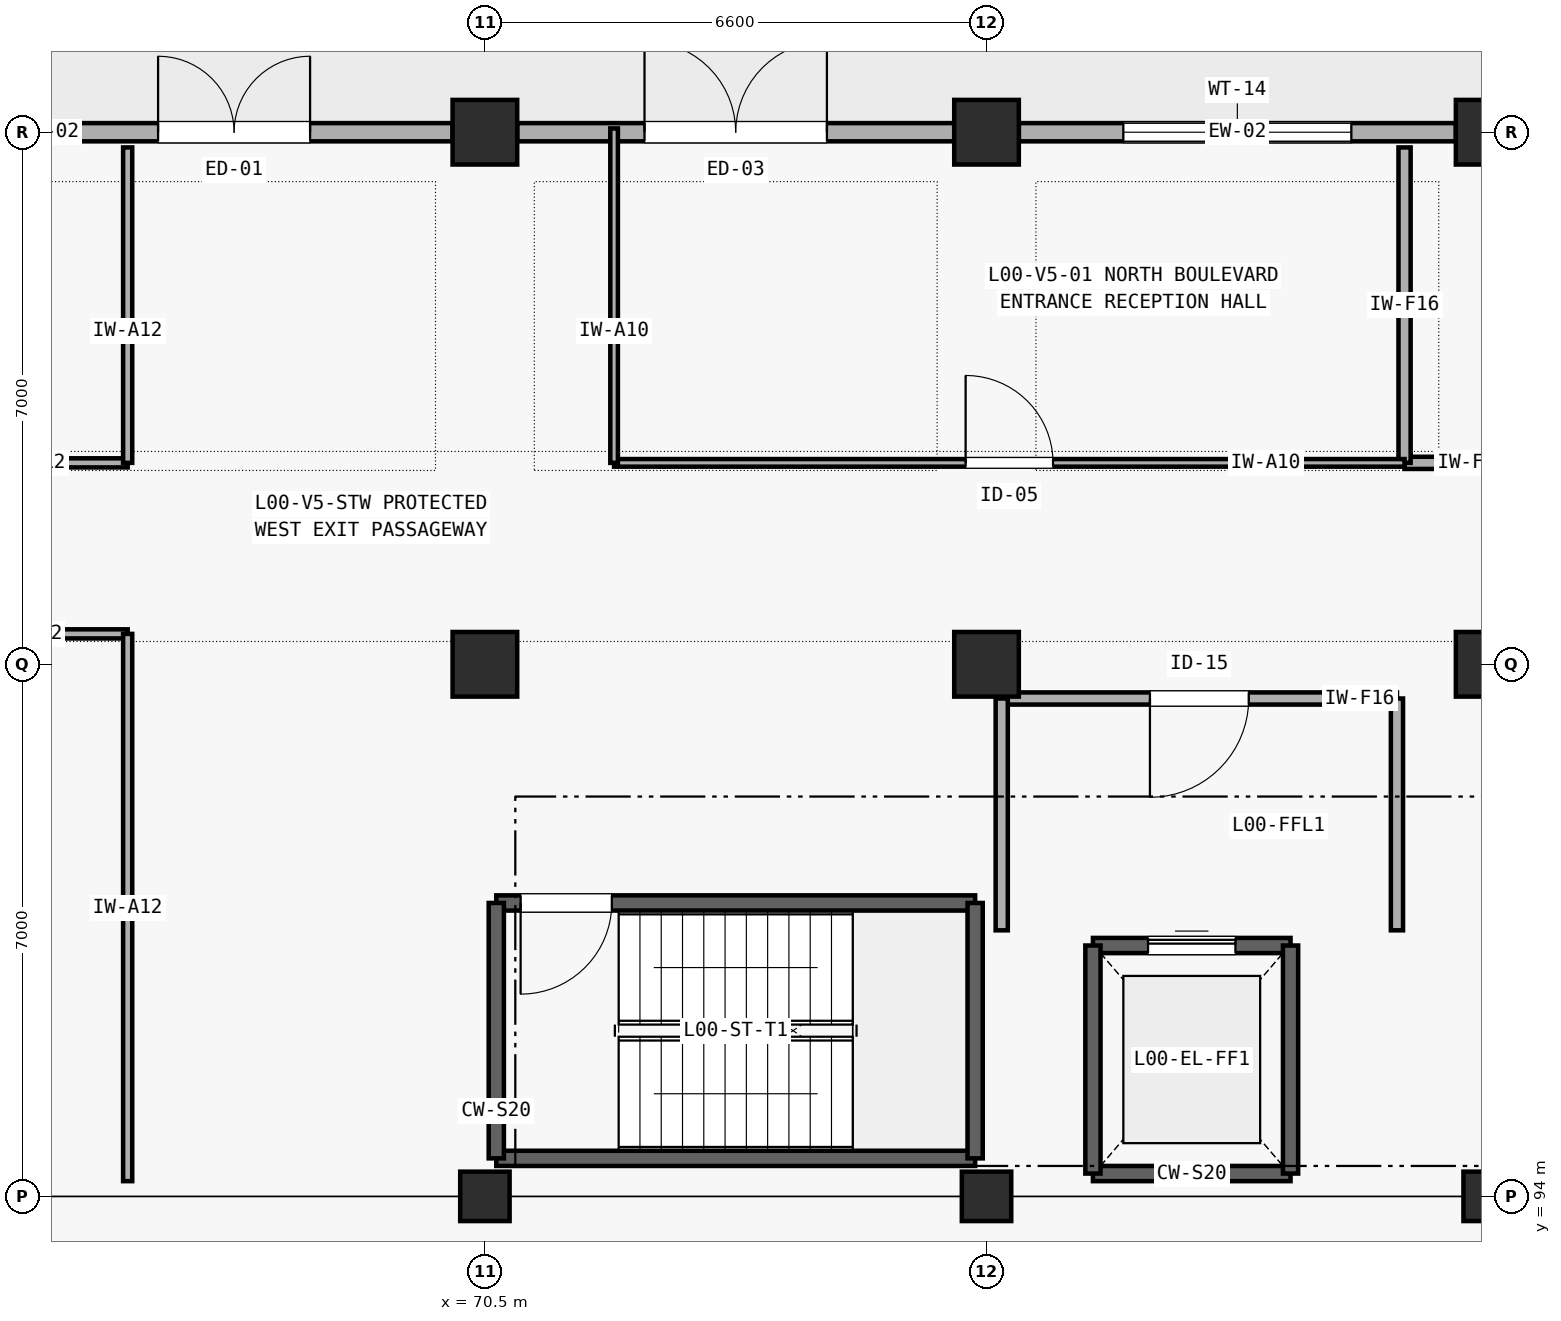
"""IFC4 building model, lengths in metres.
Left out: names, types, materials, properties, quantities, classifications, styles, units other than length and angle.
Written with IfcOpenShell. Run it as: python <this file> out.ifc"""

import sys

from ifc_helpers import new_model, si_unit, direction, frame, frame_2d, origin, origin_2d, place, context, subcontext, project, spatial, rectangle, extrude, element, fill, save


model = new_model("IFC4")
c1 = context("Model", 3, precision=1e-05, world=origin(), true_north=direction((0.0, 1.0)))
c2 = subcontext(c1, "Body", "Model", "MODEL_VIEW")
j1 = project(units=[si_unit("LENGTHUNIT", "METRE"), si_unit("PLANEANGLEUNIT", "RADIAN")], contexts=[c1])
p1 = place(None, origin())
s1 = spatial("IfcSite", under=j1, at=p1, CompositionType="ELEMENT")
p2 = place(p1, origin())
s2 = spatial("IfcBuilding", under=s1, at=p2, CompositionType="ELEMENT")
p3 = place(p2, origin())
s3 = spatial("IfcBuildingStorey", under=s2, at=p3, CompositionType="ELEMENT", Elevation=0.0)
p4 = place(p3, frame((70.5, 94.0, 0.0), z_axis=(0.0, 0.0, 1.0), x_axis=(1.0, 0.0, 0.0)))
e1 = element("IfcColumn", 1, at=p4, inside=s3, PredefinedType="COLUMN", context=c2, shape_type="SweptSolid", body=[
    extrude(rectangle(XDim=0.65, YDim=0.65, at=origin_2d()), origin(), (0.0, 0.0, 1.0), 4.2),
])
for number, where, z_axis, x_axis in (
    (2, (70.5, 101.0, 0.0), (0.0, 0.0, 1.0), (1.0, 0.0, 0.0)),
    (3, (70.5, 108.0, 0.0), (0.0, 0.0, 1.0), (1.0, 0.0, 0.0)),
):
    element("IfcColumn", number, at=place(p3, frame(where, z_axis=z_axis, x_axis=x_axis)), inside=s3, PredefinedType="COLUMN", context=c2, shape_type="SweptSolid", body=[
        extrude(rectangle(XDim=0.85, YDim=0.85, at=origin_2d()), origin(), (0.0, 0.0, 1.0), 4.2),
    ])
p5 = place(p3, frame((77.1, 94.0, 0.0), z_axis=(0.0, 0.0, 1.0), x_axis=(1.0, 0.0, 0.0)))
e4 = element("IfcColumn", 4, at=p5, inside=s3, PredefinedType="COLUMN", context=c2, shape_type="SweptSolid", body=[
    extrude(rectangle(XDim=0.65, YDim=0.65, at=origin_2d()), origin(), (0.0, 0.0, 1.0), 4.2),
])
for number, where, z_axis, x_axis in (
    (5, (77.1, 101.0, 0.0), (0.0, 0.0, 1.0), (1.0, 0.0, 0.0)),
    (6, (77.1, 108.0, 0.0), (0.0, 0.0, 1.0), (1.0, 0.0, 0.0)),
):
    element("IfcColumn", number, at=place(p3, frame(where, z_axis=z_axis, x_axis=x_axis)), inside=s3, PredefinedType="COLUMN", context=c2, shape_type="SweptSolid", body=[
        extrude(rectangle(XDim=0.85, YDim=0.85, at=origin_2d()), origin(), (0.0, 0.0, 1.0), 4.2),
    ])
p6 = place(p3, frame((83.7, 94.0, 0.0), z_axis=(0.0, 0.0, 1.0), x_axis=(1.0, 0.0, 0.0)))
e7 = element("IfcColumn", 7, at=p6, inside=s3, PredefinedType="COLUMN", context=c2, shape_type="SweptSolid", body=[
    extrude(rectangle(XDim=0.65, YDim=0.65, at=origin_2d()), origin(), (0.0, 0.0, 1.0), 4.2),
])
for number, where, z_axis, x_axis in (
    (8, (83.7, 101.0, 0.0), (0.0, 0.0, 1.0), (1.0, 0.0, 0.0)),
    (9, (83.7, 108.0, 0.0), (0.0, 0.0, 1.0), (1.0, 0.0, 0.0)),
):
    element("IfcColumn", number, at=place(p3, frame(where, z_axis=z_axis, x_axis=x_axis)), inside=s3, PredefinedType="COLUMN", context=c2, shape_type="SweptSolid", body=[
        extrude(rectangle(XDim=0.85, YDim=0.85, at=origin_2d()), origin(), (0.0, 0.0, 1.0), 4.2),
    ])
p7 = place(p3, frame((64.325, 108.0, 0.0), z_axis=(0.0, 0.0, 1.0), x_axis=(1.0, 0.0, 0.0)))
e10 = element("IfcWall", 10, at=p7, inside=s3, PredefinedType="SOLIDWALL", context=c2, shape_type="SweptSolid", body=[
    extrude(rectangle(XDim=5.75, YDim=0.24, at=frame_2d((2.875, 0.0))), origin(), (0.0, 0.0, 1.0), 3.345),
])
p8 = place(p7, frame((1.875, 0.0, 0.0)))
e11 = element("IfcOpeningElement", 11, at=p8, cuts=e10, PredefinedType="OPENING", context=c2, shape_type="SweptSolid", body=[
    extrude(rectangle(XDim=2.0, YDim=2.2, at=frame_2d((1.0, 1.1))), frame((0.0, 0.13, 0.0), z_axis=(0.0, -1.0, 0.0), x_axis=(1.0, 0.0, 0.0)), (0.0, 0.0, 1.0), 0.26),
])
p9 = place(p3, frame((70.925, 108.0, 0.0), z_axis=(0.0, 0.0, 1.0), x_axis=(1.0, 0.0, 0.0)))
e12 = element("IfcWall", 12, at=p9, inside=s3, PredefinedType="SOLIDWALL", context=c2, shape_type="SweptSolid", body=[
    extrude(rectangle(XDim=5.75, YDim=0.24, at=frame_2d((2.875, 0.0))), origin(), (0.0, 0.0, 1.0), 3.345),
])
p10 = place(p9, frame((1.675, 0.0, 0.0)))
e13 = element("IfcOpeningElement", 13, at=p10, cuts=e12, PredefinedType="OPENING", context=c2, shape_type="SweptSolid", body=[
    extrude(rectangle(XDim=2.4, YDim=2.25, at=frame_2d((1.2, 1.125))), frame((0.0, 0.13, 0.0), z_axis=(0.0, -1.0, 0.0), x_axis=(1.0, 0.0, 0.0)), (0.0, 0.0, 1.0), 0.26),
])
p11 = place(p3, frame((77.525, 108.0, 0.0), z_axis=(0.0, 0.0, 1.0), x_axis=(1.0, 0.0, 0.0)))
e14 = element("IfcWall", 14, at=p11, inside=s3, PredefinedType="SOLIDWALL", context=c2, shape_type="SweptSolid", body=[
    extrude(rectangle(XDim=5.75, YDim=0.24, at=frame_2d((2.875, 0.0))), origin(), (0.0, 0.0, 1.0), 3.135),
])
p12 = place(p11, frame((1.375, 0.0, 0.85)))
e15 = element("IfcOpeningElement", 15, at=p12, cuts=e14, PredefinedType="OPENING", context=c2, shape_type="SweptSolid", body=[
    extrude(rectangle(XDim=3.0, YDim=1.5, at=frame_2d((1.5, 0.75))), frame((0.0, 0.13, 0.0), z_axis=(0.0, -1.0, 0.0), x_axis=(1.0, 0.0, 0.0)), (0.0, 0.0, 1.0), 0.26),
])
p13 = place(p3, frame((70.65, 94.5, 0.0), z_axis=(0.0, 0.0, 1.0), x_axis=(1.0, 0.0, 0.0)))
e16 = element("IfcWall", 16, at=p13, inside=s3, PredefinedType="SHEAR", context=c2, shape_type="SweptSolid", body=[
    extrude(rectangle(XDim=6.3, YDim=0.2, at=frame_2d((3.15, 0.0))), origin(), (0.0, 0.0, 1.0), 4.2),
])
p14 = place(p3, frame((70.65, 97.86, 0.0), z_axis=(0.0, 0.0, 1.0), x_axis=(1.0, 0.0, 0.0)))
e17 = element("IfcWall", 17, at=p14, inside=s3, PredefinedType="SHEAR", context=c2, shape_type="SweptSolid", body=[
    extrude(rectangle(XDim=6.3, YDim=0.2, at=frame_2d((3.15, 0.0))), origin(), (0.0, 0.0, 1.0), 4.2),
])
p15 = place(p14, frame((0.32, 0.0, 0.0)))
e18 = element("IfcOpeningElement", 18, at=p15, cuts=e17, PredefinedType="OPENING", context=c2, shape_type="SweptSolid", body=[
    extrude(rectangle(XDim=1.2, YDim=2.15, at=frame_2d((0.6, 1.075))), frame((0.0, 0.11, 0.0), z_axis=(0.0, -1.0, 0.0), x_axis=(1.0, 0.0, 0.0)), (0.0, 0.0, 1.0), 0.22),
])
for number, where, z_axis, x_axis in (
    (19, (70.65, 94.5, 0.0), (0.0, 0.0, 1.0), (0.0, 1.0, 0.0)),
    (20, (76.95, 94.5, 0.0), (0.0, 0.0, 1.0), (0.0, 1.0, 0.0)),
):
    element("IfcWall", number, at=place(p3, frame(where, z_axis=z_axis, x_axis=x_axis)), inside=s3, PredefinedType="SHEAR", context=c2, shape_type="SweptSolid", body=[
        extrude(rectangle(XDim=3.36, YDim=0.2, at=frame_2d((1.68, 0.0))), origin(), (0.0, 0.0, 1.0), 4.2),
    ])
p16 = place(p3, frame((78.5, 94.3, 0.0), z_axis=(0.0, 0.0, 1.0), x_axis=(1.0, 0.0, 0.0)))
e21 = element("IfcWall", 21, at=p16, inside=s3, PredefinedType="SHEAR", context=c2, shape_type="SweptSolid", body=[
    extrude(rectangle(XDim=2.6, YDim=0.2, at=frame_2d((1.3, 0.0))), origin(), (0.0, 0.0, 1.0), 4.2),
])
p17 = place(p3, frame((78.5, 97.3, 0.0), z_axis=(0.0, 0.0, 1.0), x_axis=(1.0, 0.0, 0.0)))
e22 = element("IfcWall", 22, at=p17, inside=s3, PredefinedType="SHEAR", context=c2, shape_type="SweptSolid", body=[
    extrude(rectangle(XDim=2.6, YDim=0.2, at=frame_2d((1.3, 0.0))), origin(), (0.0, 0.0, 1.0), 4.2),
])
p18 = place(p17, frame((0.725, 0.0, 0.0)))
e23 = element("IfcOpeningElement", 23, at=p18, cuts=e22, PredefinedType="OPENING", context=c2, shape_type="SweptSolid", body=[
    extrude(rectangle(XDim=1.15, YDim=2.2, at=frame_2d((0.575, 1.1))), frame((0.0, 0.11, 0.0), z_axis=(0.0, -1.0, 0.0), x_axis=(1.0, 0.0, 0.0)), (0.0, 0.0, 1.0), 0.22),
])
for number, where, z_axis, x_axis in (
    (24, (78.5, 94.3, 0.0), (0.0, 0.0, 1.0), (0.0, 1.0, 0.0)),
    (25, (81.1, 94.3, 0.0), (0.0, 0.0, 1.0), (0.0, 1.0, 0.0)),
):
    element("IfcWall", number, at=place(p3, frame(where, z_axis=z_axis, x_axis=x_axis)), inside=s3, PredefinedType="SHEAR", context=c2, shape_type="SweptSolid", body=[
        extrude(rectangle(XDim=3.0, YDim=0.2, at=frame_2d((1.5, 0.0))), origin(), (0.0, 0.0, 1.0), 4.2),
    ])
p19 = place(p3, frame((77.3, 100.55, 0.0), z_axis=(0.0, 0.0, 1.0), x_axis=(1.0, 0.0, 0.0)))
e26 = element("IfcWall", 26, at=p19, inside=s3, PredefinedType="SOLIDWALL", context=c2, shape_type="SweptSolid", body=[
    extrude(rectangle(XDim=5.2, YDim=0.16, at=frame_2d((2.6, 0.0))), origin(), (0.0, 0.0, 1.0), 3.9),
])
p20 = place(p19, frame((1.95, 0.0, 0.0)))
e27 = element("IfcOpeningElement", 27, at=p20, cuts=e26, PredefinedType="OPENING", context=c2, shape_type="SweptSolid", body=[
    extrude(rectangle(XDim=1.3, YDim=2.15, at=frame_2d((0.65, 1.075))), frame((0.0, 0.09, 0.0), z_axis=(0.0, -1.0, 0.0), x_axis=(1.0, 0.0, 0.0)), (0.0, 0.0, 1.0), 0.18),
])
p21 = place(p3, frame((77.3, 97.5, 0.0), z_axis=(0.0, 0.0, 1.0), x_axis=(0.0, 1.0, 0.0)))
e28 = element("IfcWall", 28, at=p21, inside=s3, PredefinedType="SOLIDWALL", context=c2, shape_type="SweptSolid", body=[
    extrude(rectangle(XDim=3.05, YDim=0.16, at=frame_2d((1.525, 0.0))), origin(), (0.0, 0.0, 1.0), 3.405),
])
p22 = place(p3, frame((82.5, 97.5, 0.0), z_axis=(0.0, 0.0, 1.0), x_axis=(0.0, 1.0, 0.0)))
e29 = element("IfcWall", 29, at=p22, inside=s3, PredefinedType="SOLIDWALL", context=c2, shape_type="SweptSolid", body=[
    extrude(rectangle(XDim=3.05, YDim=0.16, at=frame_2d((1.525, 0.0))), origin(), (0.0, 0.0, 1.0), 3.9),
])
p23 = place(p3, frame((82.6, 103.65, 0.0), z_axis=(0.0, 0.0, 1.0), x_axis=(1.0, 0.0, 0.0)))
e30 = element("IfcWall", 30, at=p23, inside=s3, PredefinedType="SOLIDWALL", context=c2, shape_type="SweptSolid", body=[
    extrude(rectangle(XDim=6.6, YDim=0.16, at=frame_2d((3.3, 0.0))), origin(), (0.0, 0.0, 1.0), 3.9),
])
p24 = place(p23, frame((2.75, 0.0, 0.0)))
e31 = element("IfcOpeningElement", 31, at=p24, cuts=e30, PredefinedType="OPENING", context=c2, shape_type="SweptSolid", body=[
    extrude(rectangle(XDim=1.1, YDim=2.2, at=frame_2d((0.55, 1.1))), frame((0.0, 0.09, 0.0), z_axis=(0.0, -1.0, 0.0), x_axis=(1.0, 0.0, 0.0)), (0.0, 0.0, 1.0), 0.18),
])
p25 = place(p3, frame((82.6, 103.65, 0.0), z_axis=(0.0, 0.0, 1.0), x_axis=(0.0, 1.0, 0.0)))
e32 = element("IfcWall", 32, at=p25, inside=s3, PredefinedType="SOLIDWALL", context=c2, shape_type="SweptSolid", body=[
    extrude(rectangle(XDim=4.15, YDim=0.16, at=frame_2d((2.075, 0.0))), origin(), (0.0, 0.0, 1.0), 3.9),
])
p26 = place(p3, frame((72.2, 103.65, 0.0), z_axis=(0.0, 0.0, 1.0), x_axis=(1.0, 0.0, 0.0)))
e33 = element("IfcWall", 33, at=p26, inside=s3, PredefinedType="PARTITIONING", context=c2, shape_type="SweptSolid", body=[
    extrude(rectangle(XDim=10.4, YDim=0.1, at=frame_2d((5.2, 0.0))), origin(), (0.0, 0.0, 1.0), 3.9),
])
p27 = place(p26, frame((4.625, 0.0, 0.0)))
e34 = element("IfcOpeningElement", 34, at=p27, cuts=e33, PredefinedType="OPENING", context=c2, shape_type="SweptSolid", body=[
    extrude(rectangle(XDim=1.15, YDim=2.15, at=frame_2d((0.575, 1.075))), frame((0.0, 0.06, 0.0), z_axis=(0.0, -1.0, 0.0), x_axis=(1.0, 0.0, 0.0)), (0.0, 0.0, 1.0), 0.12),
])
p28 = place(p3, frame((72.2, 103.65, 0.0), z_axis=(0.0, 0.0, 1.0), x_axis=(0.0, 1.0, 0.0)))
e35 = element("IfcWall", 35, at=p28, inside=s3, PredefinedType="PARTITIONING", context=c2, shape_type="SweptSolid", body=[
    extrude(rectangle(XDim=4.4, YDim=0.1, at=frame_2d((2.2, 0.0))), origin(), (0.0, 0.0, 1.0), 3.9),
])
p29 = place(p3, frame((57.5, 103.65, 0.0), z_axis=(0.0, 0.0, 1.0), x_axis=(1.0, 0.0, 0.0)))
e36 = element("IfcWall", 36, at=p29, inside=s3, PredefinedType="PARTITIONING", context=c2, shape_type="SweptSolid", body=[
    extrude(rectangle(XDim=8.3, YDim=0.12, at=frame_2d((4.15, 0.0))), origin(), (0.0, 0.0, 1.0), 3.9),
])
p30 = place(p29, frame((3.525, 0.0, 0.0)))
e37 = element("IfcOpeningElement", 37, at=p30, cuts=e36, PredefinedType="OPENING", context=c2, shape_type="SweptSolid", body=[
    extrude(rectangle(XDim=1.25, YDim=2.15, at=frame_2d((0.625, 1.075))), frame((0.0, 0.07, 0.0), z_axis=(0.0, -1.0, 0.0), x_axis=(1.0, 0.0, 0.0)), (0.0, 0.0, 1.0), 0.14),
])
p31 = place(p3, frame((65.8, 103.65, 0.0), z_axis=(0.0, 0.0, 1.0), x_axis=(0.0, 1.0, 0.0)))
e38 = element("IfcWall", 38, at=p31, inside=s3, PredefinedType="PARTITIONING", context=c2, shape_type="SweptSolid", body=[
    extrude(rectangle(XDim=4.15, YDim=0.12, at=frame_2d((2.075, 0.0))), origin(), (0.0, 0.0, 1.0), 3.9),
])
p32 = place(p3, frame((57.5, 101.4, 0.0), z_axis=(0.0, 0.0, 1.0), x_axis=(1.0, 0.0, 0.0)))
e39 = element("IfcWall", 39, at=p32, inside=s3, PredefinedType="PARTITIONING", context=c2, shape_type="SweptSolid", body=[
    extrude(rectangle(XDim=8.3, YDim=0.12, at=frame_2d((4.15, 0.0))), origin(), (0.0, 0.0, 1.0), 3.9),
])
p33 = place(p32, frame((3.225, 0.0, 0.0)))
e40 = element("IfcOpeningElement", 40, at=p33, cuts=e39, PredefinedType="OPENING", context=c2, shape_type="SweptSolid", body=[
    extrude(rectangle(XDim=1.45, YDim=2.2, at=frame_2d((0.725, 1.1))), frame((0.0, 0.07, 0.0), z_axis=(0.0, -1.0, 0.0), x_axis=(1.0, 0.0, 0.0)), (0.0, 0.0, 1.0), 0.14),
])
p34 = place(p3, frame((65.8, 94.2, 0.0), z_axis=(0.0, 0.0, 1.0), x_axis=(0.0, 1.0, 0.0)))
e41 = element("IfcWall", 41, at=p34, inside=s3, PredefinedType="PARTITIONING", context=c2, shape_type="SweptSolid", body=[
    extrude(rectangle(XDim=7.2, YDim=0.12, at=frame_2d((3.6, 0.0))), origin(), (0.0, 0.0, 1.0), 3.9),
])
p35 = place(p8, origin())
e42 = element("IfcDoor", 42, at=p35, inside=s3, OperationType="DOUBLE_DOOR_SINGLE_SWING", PredefinedType="DOOR", context=c2, shape_type="SweptSolid", body=[
    extrude(rectangle(XDim=2.0, YDim=2.2, at=frame_2d((1.0, 1.1))), frame((0.0, 0.025, 0.0), z_axis=(0.0, -1.0, 0.0), x_axis=(1.0, 0.0, 0.0)), (0.0, 0.0, 1.0), 0.05),
])
fill(e11, e42)
p36 = place(p10, origin())
e43 = element("IfcDoor", 43, at=p36, inside=s3, OperationType="DOUBLE_DOOR_SINGLE_SWING", PredefinedType="DOOR", context=c2, shape_type="SweptSolid", body=[
    extrude(rectangle(XDim=2.4, YDim=2.25, at=frame_2d((1.2, 1.125))), frame((0.0, 0.025, 0.0), z_axis=(0.0, -1.0, 0.0), x_axis=(1.0, 0.0, 0.0)), (0.0, 0.0, 1.0), 0.05),
])
fill(e13, e43)
p37 = place(p12, origin())
e44 = element("IfcWindow", 44, at=p37, inside=s3, PartitioningType="SINGLE_PANEL", PredefinedType="WINDOW", context=c2, shape_type="SweptSolid", body=[
    extrude(rectangle(XDim=3.0, YDim=1.5, at=frame_2d((1.5, 0.75))), frame((0.0, 0.03, 0.0), z_axis=(0.0, -1.0, 0.0), x_axis=(1.0, 0.0, 0.0)), (0.0, 0.0, 1.0), 0.06),
])
fill(e15, e44)
p38 = place(p15, frame((1.2, 0.0, 0.0), z_axis=(0.0, 0.0, 1.0), x_axis=(-1.0, 0.0, 0.0)))
e45 = element("IfcDoor", 45, at=p38, inside=s3, OperationType="SINGLE_SWING_RIGHT", PredefinedType="DOOR", context=c2, shape_type="SweptSolid", body=[
    extrude(rectangle(XDim=1.2, YDim=2.15, at=frame_2d((0.6, 1.075))), frame((0.0, 0.025, 0.0), z_axis=(0.0, -1.0, 0.0), x_axis=(1.0, 0.0, 0.0)), (0.0, 0.0, 1.0), 0.05),
])
fill(e18, e45)
p39 = place(p18, origin())
e46 = element("IfcDoor", 46, at=p39, inside=s3, OperationType="SLIDING_TO_LEFT", PredefinedType="DOOR", context=c2, shape_type="SweptSolid", body=[
    extrude(rectangle(XDim=1.15, YDim=2.2, at=frame_2d((0.575, 1.1))), frame((0.0, 0.025, 0.0), z_axis=(0.0, -1.0, 0.0), x_axis=(1.0, 0.0, 0.0)), (0.0, 0.0, 1.0), 0.05),
])
fill(e23, e46)
p40 = place(p20, frame((1.3, 0.0, 0.0), z_axis=(0.0, 0.0, 1.0), x_axis=(-1.0, 0.0, 0.0)))
e47 = element("IfcDoor", 47, at=p40, inside=s3, OperationType="SINGLE_SWING_RIGHT", PredefinedType="DOOR", context=c2, shape_type="SweptSolid", body=[
    extrude(rectangle(XDim=1.3, YDim=2.15, at=frame_2d((0.65, 1.075))), frame((0.0, 0.025, 0.0), z_axis=(0.0, -1.0, 0.0), x_axis=(1.0, 0.0, 0.0)), (0.0, 0.0, 1.0), 0.05),
])
fill(e27, e47)
p41 = place(p27, origin())
e48 = element("IfcDoor", 48, at=p41, inside=s3, OperationType="SINGLE_SWING_LEFT", PredefinedType="DOOR", context=c2, shape_type="SweptSolid", body=[
    extrude(rectangle(XDim=1.15, YDim=2.15, at=frame_2d((0.575, 1.075))), frame((0.0, 0.025, 0.0), z_axis=(0.0, -1.0, 0.0), x_axis=(1.0, 0.0, 0.0)), (0.0, 0.0, 1.0), 0.05),
])
fill(e34, e48)
save(model, sys.argv[1])
